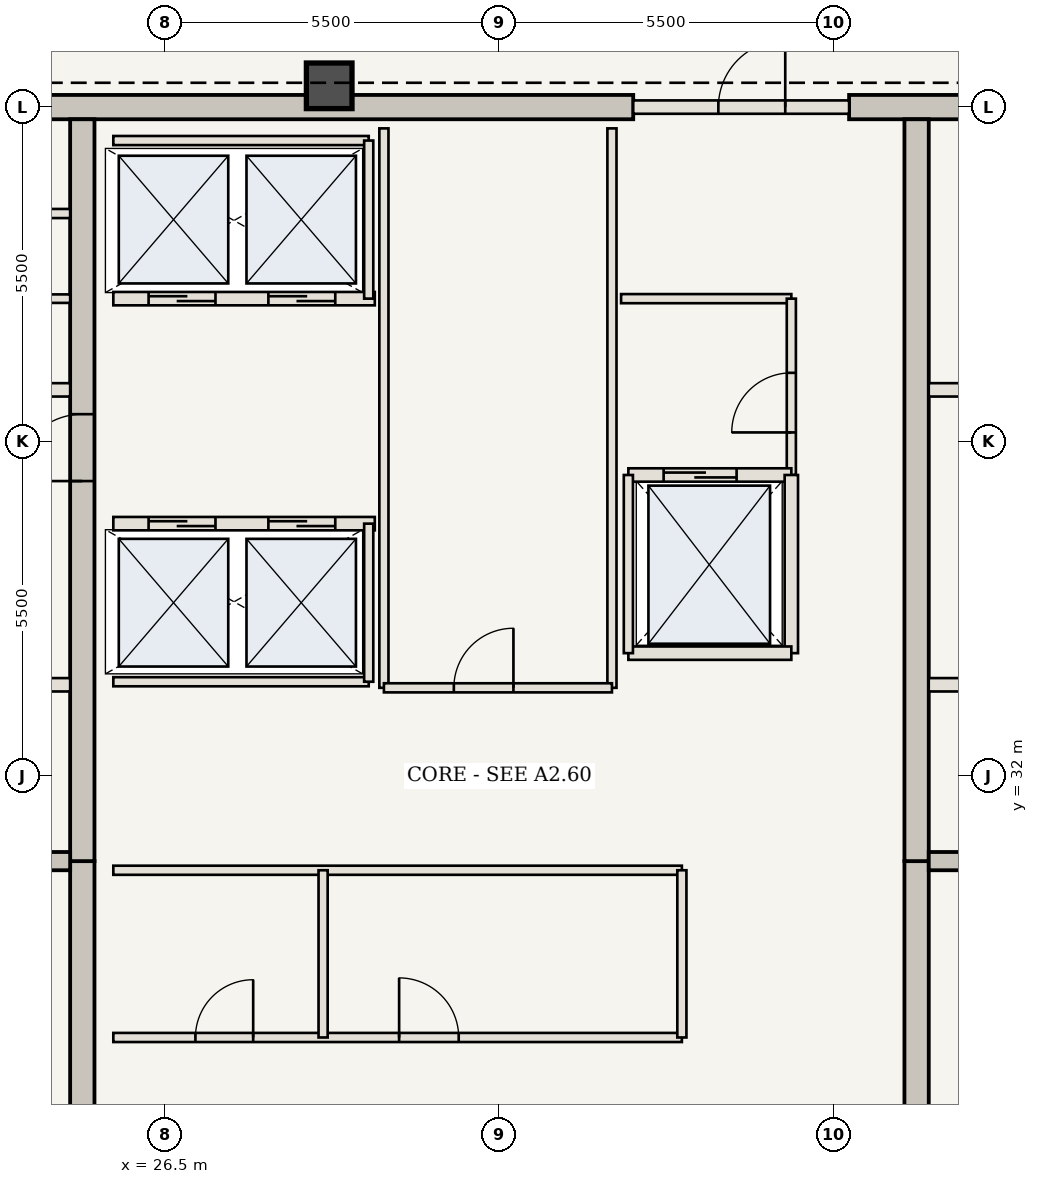
"""IFC4 building model, lengths in metres.
Left out: names, types, materials, properties, quantities, classifications, styles, units other than length and angle.
Written with IfcOpenShell. Run it as: python <this file> out.ifc"""

import sys

from ifc_helpers import new_model, si_unit, direction, frame, frame_2d, origin, origin_2d, place, context, subcontext, project, spatial, rectangle, extrude, element, fill, save


model = new_model("IFC4")
c1 = context("Model", 3, precision=1e-05, world=origin(), true_north=direction((0.0, 1.0)))
c2 = subcontext(c1, "Body", "Model", "MODEL_VIEW")
j1 = project(units=[si_unit("LENGTHUNIT", "METRE"), si_unit("PLANEANGLEUNIT", "RADIAN")], contexts=[c1])
p1 = place(None, origin())
s1 = spatial("IfcSite", under=j1, at=p1, CompositionType="ELEMENT")
p2 = place(p1, origin())
s2 = spatial("IfcBuilding", under=s1, at=p2, CompositionType="ELEMENT")
p3 = place(p2, frame((0.0, 0.0, 273.7)))
s3 = spatial("IfcBuildingStorey", under=s2, at=p3, CompositionType="ELEMENT", Elevation=273.7)
p4 = place(p3, frame((21.41, 43.0, 0.0), z_axis=(0.0, 0.0, 1.0), x_axis=(1.0, 0.0, 0.0)))
e1 = element("IfcWall", 1, at=p4, inside=s3, PredefinedType="SHEAR", context=c2, shape_type="SweptSolid", body=[
    extrude(rectangle(XDim=12.79, YDim=0.4, at=frame_2d((6.395, 0.0))), origin(), (0.0, 0.0, 1.0), 3.85),
])
p5 = place(p3, frame((37.75, 43.0, 0.0), z_axis=(0.0, 0.0, 1.0), x_axis=(1.0, 0.0, 0.0)))
e2 = element("IfcWall", 2, at=p5, inside=s3, PredefinedType="SHEAR", context=c2, shape_type="SweptSolid", body=[
    extrude(rectangle(XDim=4.84, YDim=0.4, at=frame_2d((2.42, 0.0))), origin(), (0.0, 0.0, 1.0), 3.85),
])
p6 = place(p3, frame((25.14, 21.15, 0.0), z_axis=(0.0, 0.0, 1.0), x_axis=(0.0, 1.0, 0.0)))
e3 = element("IfcWall", 3, at=p6, inside=s3, PredefinedType="SHEAR", context=c2, shape_type="SweptSolid", body=[
    extrude(rectangle(XDim=9.45, YDim=0.4, at=frame_2d((4.725, 0.0))), origin(), (0.0, 0.0, 1.0), 3.85),
])
p7 = place(p3, frame((25.14, 30.6, 0.0), z_axis=(0.0, 0.0, 1.0), x_axis=(0.0, 1.0, 0.0)))
e4 = element("IfcWall", 4, at=p7, inside=s3, PredefinedType="SHEAR", context=c2, shape_type="SweptSolid", body=[
    extrude(rectangle(XDim=12.2, YDim=0.4, at=frame_2d((6.1, 0.0))), origin(), (0.0, 0.0, 1.0), 3.85),
])
p8 = place(p7, frame((6.25, 0.0, 0.0)))
e5 = element("IfcOpeningElement", 5, at=p8, cuts=e4, PredefinedType="OPENING", context=c2, shape_type="SweptSolid", body=[
    extrude(rectangle(XDim=1.1, YDim=2.15, at=frame_2d((0.55, 1.075))), frame((0.0, 0.21, 0.0), z_axis=(0.0, -1.0, 0.0), x_axis=(1.0, 0.0, 0.0)), (0.0, 0.0, 1.0), 0.42),
])
p9 = place(p3, frame((38.86, 21.15, 0.0), z_axis=(0.0, 0.0, 1.0), x_axis=(0.0, 1.0, 0.0)))
e6 = element("IfcWall", 6, at=p9, inside=s3, PredefinedType="SHEAR", context=c2, shape_type="SweptSolid", body=[
    extrude(rectangle(XDim=9.45, YDim=0.4, at=frame_2d((4.725, 0.0))), origin(), (0.0, 0.0, 1.0), 3.85),
])
p10 = place(p3, frame((38.86, 30.6, 0.0), z_axis=(0.0, 0.0, 1.0), x_axis=(0.0, 1.0, 0.0)))
e7 = element("IfcWall", 7, at=p10, inside=s3, PredefinedType="SHEAR", context=c2, shape_type="SweptSolid", body=[
    extrude(rectangle(XDim=12.2, YDim=0.4, at=frame_2d((6.1, 0.0))), origin(), (0.0, 0.0, 1.0), 3.85),
])
p11 = place(p3, frame((29.2, 43.35, 0.0), z_axis=(0.0, 0.0, 1.0), x_axis=(1.0, 0.0, 0.0)))
e8 = element("IfcColumn", 8, at=p11, inside=s3, PredefinedType="COLUMN", context=c2, shape_type="SweptSolid", body=[
    extrude(rectangle(XDim=0.75, YDim=0.75, at=origin_2d()), origin(), (0.0, 0.0, 1.0), 3.85),
])
for number, where, z_axis, x_axis in (
    (9, (21.41, 30.6, 0.0), (0.0, 0.0, 1.0), (1.0, 0.0, 0.0)),
    (10, (39.06, 30.6, 0.0), (0.0, 0.0, 1.0), (1.0, 0.0, 0.0)),
):
    element("IfcWall", number, at=place(p3, frame(where, z_axis=z_axis, x_axis=x_axis)), inside=s3, PredefinedType="SHEAR", context=c2, shape_type="SweptSolid", body=[
        extrude(rectangle(XDim=3.53, YDim=0.3, at=frame_2d((1.765, 0.0))), origin(), (0.0, 0.0, 1.0), 3.685),
    ])
p12 = place(p3, frame((21.41, 33.5, 0.0), z_axis=(0.0, 0.0, 1.0), x_axis=(1.0, 0.0, 0.0)))
e11 = element("IfcWall", 11, at=p12, inside=s3, PredefinedType="STANDARD", context=c2, shape_type="SweptSolid", body=[
    extrude(rectangle(XDim=3.53, YDim=0.22, at=frame_2d((1.765, 0.0))), origin(), (0.0, 0.0, 1.0), 3.685),
])
p13 = place(p12, frame((0.75, 0.0, 0.0)))
e12 = element("IfcOpeningElement", 12, at=p13, cuts=e11, PredefinedType="OPENING", context=c2, shape_type="SweptSolid", body=[
    extrude(rectangle(XDim=1.2, YDim=2.2, at=frame_2d((0.6, 1.1))), frame((0.0, 0.12, 0.0), z_axis=(0.0, -1.0, 0.0), x_axis=(1.0, 0.0, 0.0)), (0.0, 0.0, 1.0), 0.24),
])
p14 = place(p3, frame((39.06, 33.5, 0.0), z_axis=(0.0, 0.0, 1.0), x_axis=(1.0, 0.0, 0.0)))
e13 = element("IfcWall", 13, at=p14, inside=s3, PredefinedType="STANDARD", context=c2, shape_type="SweptSolid", body=[
    extrude(rectangle(XDim=3.53, YDim=0.22, at=frame_2d((1.765, 0.0))), origin(), (0.0, 0.0, 1.0), 3.685),
])
p15 = place(p14, frame((1.55, 0.0, 0.0)))
e14 = element("IfcOpeningElement", 14, at=p15, cuts=e13, PredefinedType="OPENING", context=c2, shape_type="SweptSolid", body=[
    extrude(rectangle(XDim=1.2, YDim=2.2, at=frame_2d((0.6, 1.1))), frame((0.0, 0.12, 0.0), z_axis=(0.0, -1.0, 0.0), x_axis=(1.0, 0.0, 0.0)), (0.0, 0.0, 1.0), 0.24),
])
for number, where, z_axis, x_axis in (
    (15, (21.41, 38.35, 0.0), (0.0, 0.0, 1.0), (1.0, 0.0, 0.0)),
    (16, (39.06, 38.35, 0.0), (0.0, 0.0, 1.0), (1.0, 0.0, 0.0)),
):
    element("IfcWall", number, at=place(p3, frame(where, z_axis=z_axis, x_axis=x_axis)), inside=s3, PredefinedType="STANDARD", context=c2, shape_type="SweptSolid", body=[
        extrude(rectangle(XDim=3.53, YDim=0.22, at=frame_2d((1.765, 0.0))), origin(), (0.0, 0.0, 1.0), 3.685),
    ])
p16 = place(p3, frame((21.41, 39.85, 0.0), z_axis=(0.0, 0.0, 1.0), x_axis=(1.0, 0.0, 0.0)))
e17 = element("IfcWall", 17, at=p16, inside=s3, PredefinedType="STANDARD", context=c2, shape_type="SweptSolid", body=[
    extrude(rectangle(XDim=3.53, YDim=0.14, at=frame_2d((1.765, 0.0))), origin(), (0.0, 0.0, 1.0), 3.685),
])
p17 = place(p3, frame((21.41, 41.25, 0.0), z_axis=(0.0, 0.0, 1.0), x_axis=(1.0, 0.0, 0.0)))
e18 = element("IfcWall", 18, at=p17, inside=s3, PredefinedType="STANDARD", context=c2, shape_type="SweptSolid", body=[
    extrude(rectangle(XDim=3.53, YDim=0.15, at=frame_2d((1.765, 0.0))), origin(), (0.0, 0.0, 1.0), 3.685),
])
p18 = place(p3, frame((34.0, 39.85, 0.0), z_axis=(0.0, 0.0, 1.0), x_axis=(1.0, 0.0, 0.0)))
e19 = element("IfcWall", 19, at=p18, inside=s3, PredefinedType="STANDARD", context=c2, shape_type="SweptSolid", body=[
    extrude(rectangle(XDim=2.8, YDim=0.15, at=frame_2d((1.4, 0.0))), origin(), (0.0, 0.0, 1.0), 3.685),
])
p19 = place(p3, frame((36.8, 36.95, 0.0), z_axis=(0.0, 0.0, 1.0), x_axis=(0.0, 1.0, 0.0)))
e20 = element("IfcWall", 20, at=p19, inside=s3, PredefinedType="STANDARD", context=c2, shape_type="SweptSolid", body=[
    extrude(rectangle(XDim=2.9, YDim=0.15, at=frame_2d((1.45, 0.0))), origin(), (0.0, 0.0, 1.0), 3.685),
])
p20 = place(p19, frame((0.7, 0.0, 0.0)))
e21 = element("IfcOpeningElement", 21, at=p20, cuts=e20, PredefinedType="OPENING", context=c2, shape_type="SweptSolid", body=[
    extrude(rectangle(XDim=0.98, YDim=2.2, at=frame_2d((0.49, 1.1))), frame((0.0, 0.085, 0.0), z_axis=(0.0, -1.0, 0.0), x_axis=(1.0, 0.0, 0.0)), (0.0, 0.0, 1.0), 0.17),
])
p21 = place(p3, frame((25.65, 27.7, 0.0), z_axis=(0.0, 0.0, 1.0), x_axis=(1.0, 0.0, 0.0)))
e22 = element("IfcWall", 22, at=p21, inside=s3, PredefinedType="STANDARD", context=c2, shape_type="SweptSolid", body=[
    extrude(rectangle(XDim=9.35, YDim=0.15, at=frame_2d((4.675, 0.0))), origin(), (0.0, 0.0, 1.0), 3.685),
])
p22 = place(p21, frame((1.35, 0.0, 0.0)))
e23 = element("IfcOpeningElement", 23, at=p22, cuts=e22, PredefinedType="OPENING", context=c2, shape_type="SweptSolid", body=[
    extrude(rectangle(XDim=0.95, YDim=2.15, at=frame_2d((0.475, 1.075))), frame((0.0, 0.085, 0.0), z_axis=(0.0, -1.0, 0.0), x_axis=(1.0, 0.0, 0.0)), (0.0, 0.0, 1.0), 0.17),
])
p23 = place(p21, frame((4.7, 0.0, 0.0)))
e24 = element("IfcOpeningElement", 24, at=p23, cuts=e22, PredefinedType="OPENING", context=c2, shape_type="SweptSolid", body=[
    extrude(rectangle(XDim=0.98, YDim=2.2, at=frame_2d((0.49, 1.1))), frame((0.0, 0.085, 0.0), z_axis=(0.0, -1.0, 0.0), x_axis=(1.0, 0.0, 0.0)), (0.0, 0.0, 1.0), 0.17),
])
p24 = place(p3, frame((25.65, 30.45, 0.0), z_axis=(0.0, 0.0, 1.0), x_axis=(1.0, 0.0, 0.0)))
e25 = element("IfcWall", 25, at=p24, inside=s3, PredefinedType="STANDARD", context=c2, shape_type="SweptSolid", body=[
    extrude(rectangle(XDim=9.35, YDim=0.15, at=frame_2d((4.675, 0.0))), origin(), (0.0, 0.0, 1.0), 3.685),
])
for number, where, z_axis, x_axis in (
    (26, (29.1, 27.7, 0.0), (0.0, 0.0, 1.0), (0.0, 1.0, 0.0)),
    (27, (35.0, 27.7, 0.0), (0.0, 0.0, 1.0), (0.0, 1.0, 0.0)),
):
    element("IfcWall", number, at=place(p3, frame(where, z_axis=z_axis, x_axis=x_axis)), inside=s3, PredefinedType="STANDARD", context=c2, shape_type="SweptSolid", body=[
        extrude(rectangle(XDim=2.75, YDim=0.15, at=frame_2d((1.375, 0.0))), origin(), (0.0, 0.0, 1.0), 3.685),
    ])
p25 = place(p3, frame((25.65, 36.15, 0.0), z_axis=(0.0, 0.0, 1.0), x_axis=(1.0, 0.0, 0.0)))
e28 = element("IfcWall", 28, at=p25, inside=s3, PredefinedType="STANDARD", context=c2, shape_type="SweptSolid", body=[
    extrude(rectangle(XDim=4.3, YDim=0.22, at=frame_2d((2.15, 0.0))), origin(), (0.0, 0.0, 1.0), 3.685),
])
p26 = place(p25, frame((0.58, 0.0, 0.0)))
e29 = element("IfcOpeningElement", 29, at=p26, cuts=e28, PredefinedType="OPENING", context=c2, shape_type="SweptSolid", body=[
    extrude(rectangle(XDim=1.1, YDim=2.15, at=frame_2d((0.55, 1.075))), frame((0.0, 0.12, 0.0), z_axis=(0.0, -1.0, 0.0), x_axis=(1.0, 0.0, 0.0)), (0.0, 0.0, 1.0), 0.24),
])
p27 = place(p25, frame((2.55, 0.0, 0.0)))
e30 = element("IfcOpeningElement", 30, at=p27, cuts=e28, PredefinedType="OPENING", context=c2, shape_type="SweptSolid", body=[
    extrude(rectangle(XDim=1.1, YDim=2.15, at=frame_2d((0.55, 1.075))), frame((0.0, 0.12, 0.0), z_axis=(0.0, -1.0, 0.0), x_axis=(1.0, 0.0, 0.0)), (0.0, 0.0, 1.0), 0.24),
])
p28 = place(p3, frame((25.65, 33.55, 0.0), z_axis=(0.0, 0.0, 1.0), x_axis=(1.0, 0.0, 0.0)))
e31 = element("IfcWall", 31, at=p28, inside=s3, PredefinedType="STANDARD", context=c2, shape_type="SweptSolid", body=[
    extrude(rectangle(XDim=4.2, YDim=0.15, at=frame_2d((2.1, 0.0))), origin(), (0.0, 0.0, 1.0), 3.685),
])
p29 = place(p3, frame((29.85, 33.55, 0.0), z_axis=(0.0, 0.0, 1.0), x_axis=(0.0, 1.0, 0.0)))
e32 = element("IfcWall", 32, at=p29, inside=s3, PredefinedType="STANDARD", context=c2, shape_type="SweptSolid", body=[
    extrude(rectangle(XDim=2.6, YDim=0.15, at=frame_2d((1.3, 0.0))), origin(), (0.0, 0.0, 1.0), 3.685),
])
p30 = place(p3, frame((25.65, 39.85, 0.0), z_axis=(0.0, 0.0, 1.0), x_axis=(1.0, 0.0, 0.0)))
e33 = element("IfcWall", 33, at=p30, inside=s3, PredefinedType="STANDARD", context=c2, shape_type="SweptSolid", body=[
    extrude(rectangle(XDim=4.3, YDim=0.22, at=frame_2d((2.15, 0.0))), origin(), (0.0, 0.0, 1.0), 3.685),
])
p31 = place(p30, frame((0.58, 0.0, 0.0)))
e34 = element("IfcOpeningElement", 34, at=p31, cuts=e33, PredefinedType="OPENING", context=c2, shape_type="SweptSolid", body=[
    extrude(rectangle(XDim=1.1, YDim=2.15, at=frame_2d((0.55, 1.075))), frame((0.0, 0.12, 0.0), z_axis=(0.0, -1.0, 0.0), x_axis=(1.0, 0.0, 0.0)), (0.0, 0.0, 1.0), 0.24),
])
p32 = place(p30, frame((2.55, 0.0, 0.0)))
e35 = element("IfcOpeningElement", 35, at=p32, cuts=e33, PredefinedType="OPENING", context=c2, shape_type="SweptSolid", body=[
    extrude(rectangle(XDim=1.1, YDim=2.15, at=frame_2d((0.55, 1.075))), frame((0.0, 0.12, 0.0), z_axis=(0.0, -1.0, 0.0), x_axis=(1.0, 0.0, 0.0)), (0.0, 0.0, 1.0), 0.24),
])
p33 = place(p3, frame((25.65, 42.45, 0.0), z_axis=(0.0, 0.0, 1.0), x_axis=(1.0, 0.0, 0.0)))
e36 = element("IfcWall", 36, at=p33, inside=s3, PredefinedType="STANDARD", context=c2, shape_type="SweptSolid", body=[
    extrude(rectangle(XDim=4.2, YDim=0.15, at=frame_2d((2.1, 0.0))), origin(), (0.0, 0.0, 1.0), 3.685),
])
p34 = place(p3, frame((29.85, 39.85, 0.0), z_axis=(0.0, 0.0, 1.0), x_axis=(0.0, 1.0, 0.0)))
e37 = element("IfcWall", 37, at=p34, inside=s3, PredefinedType="STANDARD", context=c2, shape_type="SweptSolid", body=[
    extrude(rectangle(XDim=2.6, YDim=0.15, at=frame_2d((1.3, 0.0))), origin(), (0.0, 0.0, 1.0), 3.685),
])
for number, where, z_axis, x_axis in (
    (38, (30.1, 33.45, 0.0), (0.0, 0.0, 1.0), (0.0, 1.0, 0.0)),
    (39, (33.85, 33.45, 0.0), (0.0, 0.0, 1.0), (0.0, 1.0, 0.0)),
):
    element("IfcWall", number, at=place(p3, frame(where, z_axis=z_axis, x_axis=x_axis)), inside=s3, PredefinedType="STANDARD", context=c2, shape_type="SweptSolid", body=[
        extrude(rectangle(XDim=9.2, YDim=0.15, at=frame_2d((4.6, 0.0))), origin(), (0.0, 0.0, 1.0), 3.685),
    ])
p35 = place(p3, frame((30.1, 33.45, 0.0), z_axis=(0.0, 0.0, 1.0), x_axis=(1.0, 0.0, 0.0)))
e40 = element("IfcWall", 40, at=p35, inside=s3, PredefinedType="STANDARD", context=c2, shape_type="SweptSolid", body=[
    extrude(rectangle(XDim=3.75, YDim=0.15, at=frame_2d((1.875, 0.0))), origin(), (0.0, 0.0, 1.0), 3.685),
])
p36 = place(p35, frame((1.15, 0.0, 0.0)))
e41 = element("IfcOpeningElement", 41, at=p36, cuts=e40, PredefinedType="OPENING", context=c2, shape_type="SweptSolid", body=[
    extrude(rectangle(XDim=0.98, YDim=2.2, at=frame_2d((0.49, 1.1))), frame((0.0, 0.085, 0.0), z_axis=(0.0, -1.0, 0.0), x_axis=(1.0, 0.0, 0.0)), (0.0, 0.0, 1.0), 0.17),
])
p37 = place(p3, frame((34.2, 43.0, 0.0), z_axis=(0.0, 0.0, 1.0), x_axis=(1.0, 0.0, 0.0)))
e42 = element("IfcWall", 42, at=p37, inside=s3, PredefinedType="STANDARD", context=c2, shape_type="SweptSolid", body=[
    extrude(rectangle(XDim=3.55, YDim=0.22, at=frame_2d((1.775, 0.0))), origin(), (0.0, 0.0, 1.0), 3.685),
])
p38 = place(p37, frame((1.4, 0.0, 0.0)))
e43 = element("IfcOpeningElement", 43, at=p38, cuts=e42, PredefinedType="OPENING", context=c2, shape_type="SweptSolid", body=[
    extrude(rectangle(XDim=1.1, YDim=2.15, at=frame_2d((0.55, 1.075))), frame((0.0, 0.12, 0.0), z_axis=(0.0, -1.0, 0.0), x_axis=(1.0, 0.0, 0.0)), (0.0, 0.0, 1.0), 0.24),
])
p39 = place(p3, frame((34.12, 36.95, 0.0), z_axis=(0.0, 0.0, 1.0), x_axis=(1.0, 0.0, 0.0)))
e44 = element("IfcWall", 44, at=p39, inside=s3, PredefinedType="STANDARD", context=c2, shape_type="SweptSolid", body=[
    extrude(rectangle(XDim=2.68, YDim=0.22, at=frame_2d((1.34, 0.0))), origin(), (0.0, 0.0, 1.0), 3.685),
])
p40 = place(p39, frame((0.58, 0.0, 0.0)))
e45 = element("IfcOpeningElement", 45, at=p40, cuts=e44, PredefinedType="OPENING", context=c2, shape_type="SweptSolid", body=[
    extrude(rectangle(XDim=1.2, YDim=2.2, at=frame_2d((0.6, 1.1))), frame((0.0, 0.12, 0.0), z_axis=(0.0, -1.0, 0.0), x_axis=(1.0, 0.0, 0.0)), (0.0, 0.0, 1.0), 0.24),
])
p41 = place(p3, frame((36.8, 34.02, 0.0), z_axis=(0.0, 0.0, 1.0), x_axis=(0.0, 1.0, 0.0)))
e46 = element("IfcWall", 46, at=p41, inside=s3, PredefinedType="STANDARD", context=c2, shape_type="SweptSolid", body=[
    extrude(rectangle(XDim=2.93, YDim=0.22, at=frame_2d((1.465, 0.0))), origin(), (0.0, 0.0, 1.0), 3.685),
])
p42 = place(p3, frame((34.12, 34.02, 0.0), z_axis=(0.0, 0.0, 1.0), x_axis=(1.0, 0.0, 0.0)))
e47 = element("IfcWall", 47, at=p42, inside=s3, PredefinedType="STANDARD", context=c2, shape_type="SweptSolid", body=[
    extrude(rectangle(XDim=2.68, YDim=0.22, at=frame_2d((1.34, 0.0))), origin(), (0.0, 0.0, 1.0), 3.685),
])
p43 = place(p3, frame((34.12, 34.02, 0.0), z_axis=(0.0, 0.0, 1.0), x_axis=(0.0, 1.0, 0.0)))
e48 = element("IfcWall", 48, at=p43, inside=s3, PredefinedType="STANDARD", context=c2, shape_type="SweptSolid", body=[
    extrude(rectangle(XDim=2.93, YDim=0.15, at=frame_2d((1.465, 0.0))), origin(), (0.0, 0.0, 1.0), 3.685),
])
p44 = place(p8, origin())
e49 = element("IfcDoor", 49, at=p44, inside=s3, OperationType="SINGLE_SWING_LEFT", PredefinedType="DOOR", context=c2, shape_type="SweptSolid", body=[
    extrude(rectangle(XDim=1.1, YDim=2.15, at=frame_2d((0.55, 1.075))), frame((0.0, 0.025, 0.0), z_axis=(0.0, -1.0, 0.0), x_axis=(1.0, 0.0, 0.0)), (0.0, 0.0, 1.0), 0.05),
])
fill(e5, e49)
p45 = place(p20, origin())
e50 = element("IfcDoor", 50, at=p45, inside=s3, OperationType="SINGLE_SWING_LEFT", PredefinedType="DOOR", context=c2, shape_type="SweptSolid", body=[
    extrude(rectangle(XDim=0.98, YDim=2.2, at=frame_2d((0.49, 1.1))), frame((0.0, 0.025, 0.0), z_axis=(0.0, -1.0, 0.0), x_axis=(1.0, 0.0, 0.0)), (0.0, 0.0, 1.0), 0.05),
])
fill(e21, e50)
p46 = place(p22, origin())
e51 = element("IfcDoor", 51, at=p46, inside=s3, OperationType="SINGLE_SWING_RIGHT", PredefinedType="DOOR", context=c2, shape_type="SweptSolid", body=[
    extrude(rectangle(XDim=0.95, YDim=2.15, at=frame_2d((0.475, 1.075))), frame((0.0, 0.025, 0.0), z_axis=(0.0, -1.0, 0.0), x_axis=(1.0, 0.0, 0.0)), (0.0, 0.0, 1.0), 0.05),
])
fill(e23, e51)
p47 = place(p23, origin())
e52 = element("IfcDoor", 52, at=p47, inside=s3, OperationType="SINGLE_SWING_LEFT", PredefinedType="DOOR", context=c2, shape_type="SweptSolid", body=[
    extrude(rectangle(XDim=0.98, YDim=2.2, at=frame_2d((0.49, 1.1))), frame((0.0, 0.025, 0.0), z_axis=(0.0, -1.0, 0.0), x_axis=(1.0, 0.0, 0.0)), (0.0, 0.0, 1.0), 0.05),
])
fill(e24, e52)
p48 = place(p26, origin())
e53 = element("IfcDoor", 53, at=p48, inside=s3, OperationType="DOUBLE_DOOR_SLIDING", PredefinedType="DOOR", context=c2, shape_type="SweptSolid", body=[
    extrude(rectangle(XDim=1.1, YDim=2.15, at=frame_2d((0.55, 1.075))), frame((0.0, 0.025, 0.0), z_axis=(0.0, -1.0, 0.0), x_axis=(1.0, 0.0, 0.0)), (0.0, 0.0, 1.0), 0.05),
])
fill(e29, e53)
p49 = place(p27, origin())
e54 = element("IfcDoor", 54, at=p49, inside=s3, OperationType="DOUBLE_DOOR_SLIDING", PredefinedType="DOOR", context=c2, shape_type="SweptSolid", body=[
    extrude(rectangle(XDim=1.1, YDim=2.15, at=frame_2d((0.55, 1.075))), frame((0.0, 0.025, 0.0), z_axis=(0.0, -1.0, 0.0), x_axis=(1.0, 0.0, 0.0)), (0.0, 0.0, 1.0), 0.05),
])
fill(e30, e54)
p50 = place(p31, origin())
e55 = element("IfcDoor", 55, at=p50, inside=s3, OperationType="DOUBLE_DOOR_SLIDING", PredefinedType="DOOR", context=c2, shape_type="SweptSolid", body=[
    extrude(rectangle(XDim=1.1, YDim=2.15, at=frame_2d((0.55, 1.075))), frame((0.0, 0.025, 0.0), z_axis=(0.0, -1.0, 0.0), x_axis=(1.0, 0.0, 0.0)), (0.0, 0.0, 1.0), 0.05),
])
fill(e34, e55)
p51 = place(p32, origin())
e56 = element("IfcDoor", 56, at=p51, inside=s3, OperationType="DOUBLE_DOOR_SLIDING", PredefinedType="DOOR", context=c2, shape_type="SweptSolid", body=[
    extrude(rectangle(XDim=1.1, YDim=2.15, at=frame_2d((0.55, 1.075))), frame((0.0, 0.025, 0.0), z_axis=(0.0, -1.0, 0.0), x_axis=(1.0, 0.0, 0.0)), (0.0, 0.0, 1.0), 0.05),
])
fill(e35, e56)
p52 = place(p36, origin())
e57 = element("IfcDoor", 57, at=p52, inside=s3, OperationType="SINGLE_SWING_RIGHT", PredefinedType="DOOR", context=c2, shape_type="SweptSolid", body=[
    extrude(rectangle(XDim=0.98, YDim=2.2, at=frame_2d((0.49, 1.1))), frame((0.0, 0.025, 0.0), z_axis=(0.0, -1.0, 0.0), x_axis=(1.0, 0.0, 0.0)), (0.0, 0.0, 1.0), 0.05),
])
fill(e41, e57)
p53 = place(p38, origin())
e58 = element("IfcDoor", 58, at=p53, inside=s3, OperationType="SINGLE_SWING_RIGHT", PredefinedType="DOOR", context=c2, shape_type="SweptSolid", body=[
    extrude(rectangle(XDim=1.1, YDim=2.15, at=frame_2d((0.55, 1.075))), frame((0.0, 0.025, 0.0), z_axis=(0.0, -1.0, 0.0), x_axis=(1.0, 0.0, 0.0)), (0.0, 0.0, 1.0), 0.05),
])
fill(e43, e58)
p54 = place(p40, origin())
e59 = element("IfcDoor", 59, at=p54, inside=s3, OperationType="DOUBLE_DOOR_SLIDING", PredefinedType="DOOR", context=c2, shape_type="SweptSolid", body=[
    extrude(rectangle(XDim=1.2, YDim=2.2, at=frame_2d((0.6, 1.1))), frame((0.0, 0.025, 0.0), z_axis=(0.0, -1.0, 0.0), x_axis=(1.0, 0.0, 0.0)), (0.0, 0.0, 1.0), 0.05),
])
fill(e45, e59)
save(model, sys.argv[1])
